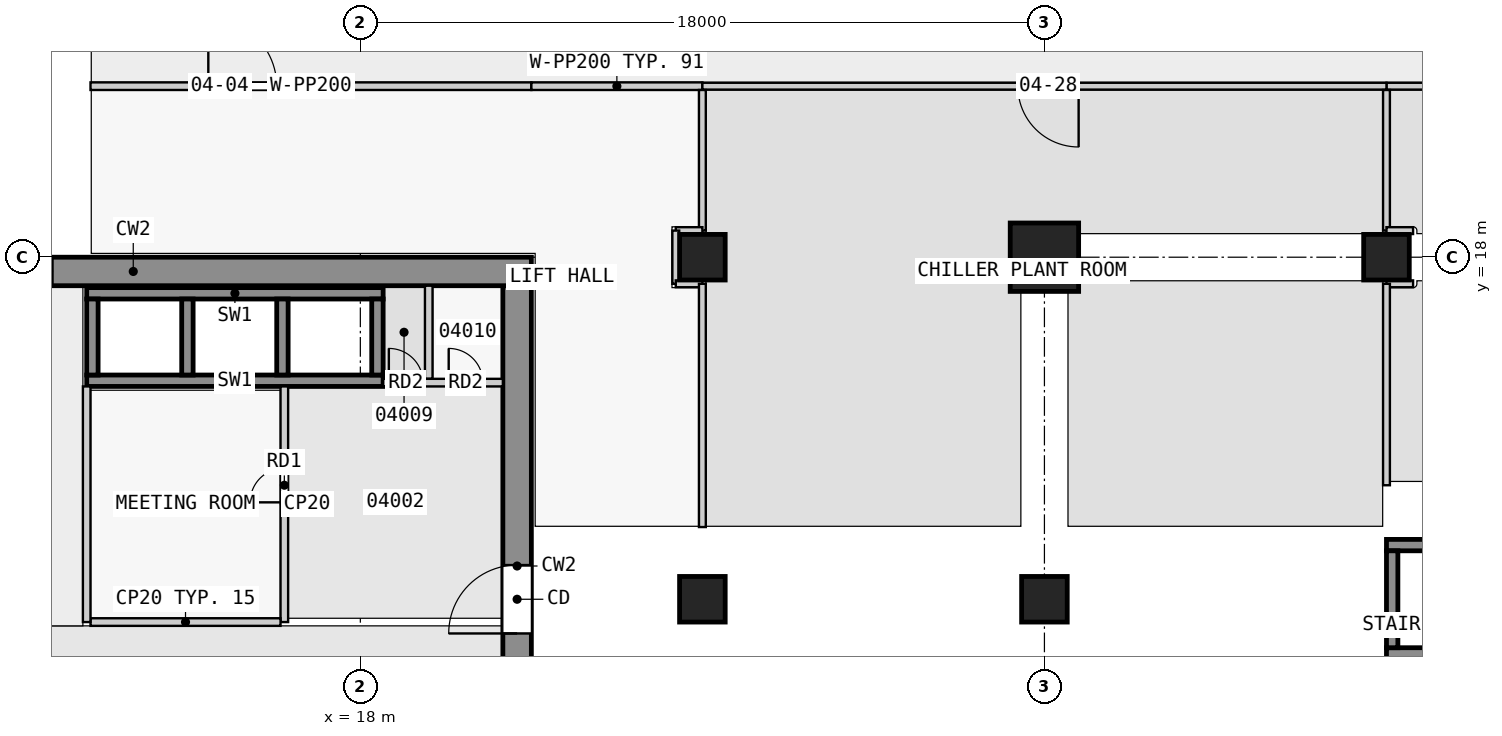
"""IFC4 building model, lengths in metres.
Left out: names, types, materials, properties, quantities, classifications, styles, units other than length and angle.
Written with IfcOpenShell. Run it as: python <this file> out.ifc"""

import sys

from ifc_helpers import new_model, si_unit, direction, frame, frame_2d, origin, origin_2d, place, context, subcontext, project, spatial, rectangle, extrude, element, fill, save


model = new_model("IFC4")
c1 = context("Model", 3, precision=1e-05, world=origin(), true_north=direction((0.0, 1.0)))
c2 = subcontext(c1, "Body", "Model", "MODEL_VIEW")
j1 = project(units=[si_unit("LENGTHUNIT", "METRE"), si_unit("PLANEANGLEUNIT", "RADIAN")], contexts=[c1])
p1 = place(None, origin())
s1 = spatial("IfcSite", under=j1, at=p1, CompositionType="ELEMENT")
p2 = place(p1, origin())
s2 = spatial("IfcBuilding", under=s1, at=p2, CompositionType="ELEMENT")
p3 = place(p2, frame((0.0, 0.0, 21.8)))
s3 = spatial("IfcBuildingStorey", under=s2, at=p3, CompositionType="ELEMENT", Elevation=21.8)
for number, where, z_axis, x_axis in (
    (1, (27.0, 9.0, 0.0), (0.0, 0.0, 1.0), (1.0, 0.0, 0.0)),
    (2, (27.0, 18.0, 0.0), (0.0, 0.0, 1.0), (1.0, 0.0, 0.0)),
    (3, (36.0, 9.0, 0.0), (0.0, 0.0, 1.0), (1.0, 0.0, 0.0)),
):
    element("IfcColumn", number, at=place(p3, frame(where, z_axis=z_axis, x_axis=x_axis)), inside=s3, PredefinedType="COLUMN", context=c2, shape_type="SweptSolid", body=[
        extrude(rectangle(XDim=1.2, YDim=1.2, at=origin_2d()), origin(), (0.0, 0.0, 1.0), 5.0),
    ])
p4 = place(p3, frame((36.0, 18.0, 0.0), z_axis=(0.0, 0.0, 1.0), x_axis=(1.0, 0.0, 0.0)))
e4 = element("IfcColumn", 4, at=p4, inside=s3, PredefinedType="COLUMN", context=c2, shape_type="SweptSolid", body=[
    extrude(rectangle(XDim=1.8, YDim=1.8, at=origin_2d()), origin(), (0.0, 0.0, 1.0), 5.0),
])
p5 = place(p3, frame((45.0, 18.0, 0.0), z_axis=(0.0, 0.0, 1.0), x_axis=(1.0, 0.0, 0.0)))
e5 = element("IfcColumn", 5, at=p5, inside=s3, PredefinedType="COLUMN", context=c2, shape_type="SweptSolid", body=[
    extrude(rectangle(XDim=1.2, YDim=1.2, at=origin_2d()), origin(), (0.0, 0.0, 1.0), 5.0),
])
p6 = place(p3, frame((1.55, 17.625, 0.0), z_axis=(0.0, 0.0, 1.0), x_axis=(1.0, 0.0, 0.0)))
e6 = element("IfcWall", 6, at=p6, inside=s3, PredefinedType="SHEAR", context=c2, shape_type="SweptSolid", body=[
    extrude(rectangle(XDim=20.95, YDim=0.75, at=frame_2d((10.475, 0.0))), origin(), (0.0, 0.0, 1.0), 4.5),
])
p7 = place(p6, frame((6.55, 0.0, 0.0)))
e7 = element("IfcOpeningElement", 7, at=p7, cuts=e6, PredefinedType="OPENING", context=c2, shape_type="SweptSolid", body=[
    extrude(rectangle(XDim=1.8, YDim=2.1, at=frame_2d((0.9, 1.05))), frame((0.0, 0.385, 0.0), z_axis=(0.0, -1.0, 0.0), x_axis=(1.0, 0.0, 0.0)), (0.0, 0.0, 1.0), 0.77),
])
p8 = place(p3, frame((22.125, 2.5, 0.0), z_axis=(0.0, 0.0, 1.0), x_axis=(0.0, 1.0, 0.0)))
e8 = element("IfcWall", 8, at=p8, inside=s3, PredefinedType="SHEAR", context=c2, shape_type="SweptSolid", body=[
    extrude(rectangle(XDim=14.75, YDim=0.75, at=frame_2d((7.375, 0.0))), origin(), (0.0, 0.0, 1.0), 4.5),
])
p9 = place(p8, frame((5.6, 0.0, 0.0)))
e9 = element("IfcOpeningElement", 9, at=p9, cuts=e8, PredefinedType="OPENING", context=c2, shape_type="SweptSolid", body=[
    extrude(rectangle(XDim=1.8, YDim=2.1, at=frame_2d((0.9, 1.05))), frame((0.0, 0.385, 0.0), z_axis=(0.0, -1.0, 0.0), x_axis=(1.0, 0.0, 0.0)), (0.0, 0.0, 1.0), 0.77),
])
p10 = place(p8, frame((3.45, 0.0, 0.0)))
e10 = element("IfcOpeningElement", 10, at=p10, cuts=e8, PredefinedType="OPENING", context=c2, shape_type="SweptSolid", body=[
    extrude(rectangle(XDim=1.1, YDim=2.1, at=frame_2d((0.55, 1.05))), frame((0.0, 0.385, 0.0), z_axis=(0.0, -1.0, 0.0), x_axis=(1.0, 0.0, 0.0)), (0.0, 0.0, 1.0), 0.77),
])
for number, where, z_axis, x_axis in (
    (11, (10.8, 17.05, 0.0), (0.0, 0.0, 1.0), (1.0, 0.0, 0.0)),
    (12, (10.8, 14.75, 0.0), (0.0, 0.0, 1.0), (1.0, 0.0, 0.0)),
):
    element("IfcWall", number, at=place(p3, frame(where, z_axis=z_axis, x_axis=x_axis)), inside=s3, PredefinedType="SHEAR", context=c2, shape_type="SweptSolid", body=[
        extrude(rectangle(XDim=7.8, YDim=0.3, at=frame_2d((3.9, 0.0))), origin(), (0.0, 0.0, 1.0), 4.5),
    ])
for number, where, z_axis, x_axis in (
    (13, (10.95, 14.9, 0.0), (0.0, 0.0, 1.0), (0.0, 1.0, 0.0)),
    (14, (13.45, 14.9, 0.0), (0.0, 0.0, 1.0), (0.0, 1.0, 0.0)),
    (15, (15.95, 14.9, 0.0), (0.0, 0.0, 1.0), (0.0, 1.0, 0.0)),
    (16, (18.45, 14.9, 0.0), (0.0, 0.0, 1.0), (0.0, 1.0, 0.0)),
):
    element("IfcWall", number, at=place(p3, frame(where, z_axis=z_axis, x_axis=x_axis)), inside=s3, PredefinedType="SHEAR", context=c2, shape_type="SweptSolid", body=[
        extrude(rectangle(XDim=2.0, YDim=0.3, at=frame_2d((1.0, 0.0))), origin(), (0.0, 0.0, 1.0), 4.5),
    ])
p11 = place(p3, frame((45.15, 7.725, 0.0), z_axis=(0.0, 0.0, 1.0), x_axis=(0.0, 1.0, 0.0)))
e17 = element("IfcWall", 17, at=p11, inside=s3, PredefinedType="SHEAR", context=c2, shape_type="SweptSolid", body=[
    extrude(rectangle(XDim=2.55, YDim=0.3, at=frame_2d((1.275, 0.0))), origin(), (0.0, 0.0, 1.0), 5.0),
])
for number, where, z_axis, x_axis in (
    (18, (45.0, 7.575, 0.0), (0.0, 0.0, 1.0), (1.0, 0.0, 0.0)),
    (19, (45.0, 10.425, 0.0), (0.0, 0.0, 1.0), (1.0, 0.0, 0.0)),
):
    element("IfcWall", number, at=place(p3, frame(where, z_axis=z_axis, x_axis=x_axis)), inside=s3, PredefinedType="SHEAR", context=c2, shape_type="SweptSolid", body=[
        extrude(rectangle(XDim=7.2, YDim=0.3, at=frame_2d((3.6, 0.0))), origin(), (0.0, 0.0, 1.0), 5.0),
    ])
p12 = place(p3, frame((10.8, 8.4, 0.0), z_axis=(0.0, 0.0, 1.0), x_axis=(0.0, 1.0, 0.0)))
e20 = element("IfcWall", 20, at=p12, inside=s3, PredefinedType="PARTITIONING", context=c2, shape_type="SweptSolid", body=[
    extrude(rectangle(XDim=6.2, YDim=0.2, at=frame_2d((3.1, 0.0))), origin(), (0.0, 0.0, 1.0), 4.5),
])
p13 = place(p3, frame((10.9, 8.4, 0.0), z_axis=(0.0, 0.0, 1.0), x_axis=(1.0, 0.0, 0.0)))
e21 = element("IfcWall", 21, at=p13, inside=s3, PredefinedType="PARTITIONING", context=c2, shape_type="SweptSolid", body=[
    extrude(rectangle(XDim=5.0, YDim=0.2, at=frame_2d((2.5, 0.0))), origin(), (0.0, 0.0, 1.0), 4.5),
])
p14 = place(p3, frame((16.0, 8.4, 0.0), z_axis=(0.0, 0.0, 1.0), x_axis=(0.0, 1.0, 0.0)))
e22 = element("IfcWall", 22, at=p14, inside=s3, PredefinedType="PARTITIONING", context=c2, shape_type="SweptSolid", body=[
    extrude(rectangle(XDim=6.2, YDim=0.2, at=frame_2d((3.1, 0.0))), origin(), (0.0, 0.0, 1.0), 4.5),
])
p15 = place(p14, frame((3.15, 0.0, 0.0)))
e23 = element("IfcOpeningElement", 23, at=p15, cuts=e22, PredefinedType="OPENING", context=c2, shape_type="SweptSolid", body=[
    extrude(rectangle(XDim=0.9, YDim=2.1, at=frame_2d((0.45, 1.05))), frame((0.0, 0.11, 0.0), z_axis=(0.0, -1.0, 0.0), x_axis=(1.0, 0.0, 0.0)), (0.0, 0.0, 1.0), 0.22),
])
p16 = place(p3, frame((18.6, 14.7, 0.0), z_axis=(0.0, 0.0, 1.0), x_axis=(1.0, 0.0, 0.0)))
e24 = element("IfcWall", 24, at=p16, inside=s3, PredefinedType="PARTITIONING", context=c2, shape_type="SweptSolid", body=[
    extrude(rectangle(XDim=3.15, YDim=0.2, at=frame_2d((1.575, 0.0))), origin(), (0.0, 0.0, 1.0), 4.5),
])
p17 = place(p16, frame((0.15, 0.0, 0.0)))
e25 = element("IfcOpeningElement", 25, at=p17, cuts=e24, PredefinedType="OPENING", context=c2, shape_type="SweptSolid", body=[
    extrude(rectangle(XDim=0.9, YDim=2.1, at=frame_2d((0.45, 1.05))), frame((0.0, 0.11, 0.0), z_axis=(0.0, -1.0, 0.0), x_axis=(1.0, 0.0, 0.0)), (0.0, 0.0, 1.0), 0.22),
])
p18 = place(p16, frame((1.725, 0.0, 0.0)))
e26 = element("IfcOpeningElement", 26, at=p18, cuts=e24, PredefinedType="OPENING", context=c2, shape_type="SweptSolid", body=[
    extrude(rectangle(XDim=0.9, YDim=2.1, at=frame_2d((0.45, 1.05))), frame((0.0, 0.11, 0.0), z_axis=(0.0, -1.0, 0.0), x_axis=(1.0, 0.0, 0.0)), (0.0, 0.0, 1.0), 0.22),
])
p19 = place(p3, frame((19.8, 14.8, 0.0), z_axis=(0.0, 0.0, 1.0), x_axis=(0.0, 1.0, 0.0)))
e27 = element("IfcWall", 27, at=p19, inside=s3, PredefinedType="PARTITIONING", context=c2, shape_type="SweptSolid", body=[
    extrude(rectangle(XDim=2.45, YDim=0.2, at=frame_2d((1.225, 0.0))), origin(), (0.0, 0.0, 1.0), 4.5),
])
p20 = place(p3, frame((10.9, 22.5, 0.0), z_axis=(0.0, 0.0, 1.0), x_axis=(1.0, 0.0, 0.0)))
e28 = element("IfcWall", 28, at=p20, inside=s3, PredefinedType="PARTITIONING", context=c2, shape_type="SweptSolid", body=[
    extrude(rectangle(XDim=11.6, YDim=0.2, at=frame_2d((5.8, 0.0))), origin(), (0.0, 0.0, 1.0), 4.5),
])
p21 = place(p20, frame((3.1, 0.0, 0.0)))
e29 = element("IfcOpeningElement", 29, at=p21, cuts=e28, PredefinedType="OPENING", context=c2, shape_type="SweptSolid", body=[
    extrude(rectangle(XDim=1.8, YDim=2.1, at=frame_2d((0.9, 1.05))), frame((0.0, 0.11, 0.0), z_axis=(0.0, -1.0, 0.0), x_axis=(1.0, 0.0, 0.0)), (0.0, 0.0, 1.0), 0.22),
])
p22 = place(p3, frame((22.5, 22.5, 0.0), z_axis=(0.0, 0.0, 1.0), x_axis=(1.0, 0.0, 0.0)))
e30 = element("IfcWall", 30, at=p22, inside=s3, PredefinedType="PARTITIONING", context=c2, shape_type="SweptSolid", body=[
    extrude(rectangle(XDim=4.5, YDim=0.2, at=frame_2d((2.25, 0.0))), origin(), (0.0, 0.0, 1.0), 4.5),
])
p23 = place(p3, frame((72.0, 22.5, 0.0), z_axis=(0.0, 0.0, 1.0), x_axis=(-1.0, 0.0, 0.0)))
e31 = element("IfcWall", 31, at=p23, inside=s3, PredefinedType="PARTITIONING", context=c2, shape_type="SweptSolid", body=[
    extrude(rectangle(XDim=27.0, YDim=0.18, at=frame_2d((13.5, 0.0))), origin(), (0.0, 0.0, 1.0), 4.5),
])
p24 = place(p3, frame((45.0, 22.5, 0.0), z_axis=(0.0, 0.0, 1.0), x_axis=(-1.0, 0.0, 0.0)))
e32 = element("IfcWall", 32, at=p24, inside=s3, PredefinedType="PARTITIONING", context=c2, shape_type="SweptSolid", body=[
    extrude(rectangle(XDim=18.0, YDim=0.18, at=frame_2d((9.0, 0.0))), origin(), (0.0, 0.0, 1.0), 4.5),
])
p25 = place(p24, frame((8.1, 0.0, 0.0)))
e33 = element("IfcOpeningElement", 33, at=p25, cuts=e32, PredefinedType="OPENING", context=c2, shape_type="SweptSolid", body=[
    extrude(rectangle(XDim=1.6, YDim=2.4, at=frame_2d((0.8, 1.2))), frame((0.0, 0.1, 0.0), z_axis=(0.0, -1.0, 0.0), x_axis=(1.0, 0.0, 0.0)), (0.0, 0.0, 1.0), 0.2),
])
p26 = place(p3, frame((27.0, 22.4, 0.0), z_axis=(0.0, 0.0, 1.0), x_axis=(0.0, -1.0, 0.0)))
e34 = element("IfcWall", 34, at=p26, inside=s3, PredefinedType="PARTITIONING", context=c2, shape_type="SweptSolid", body=[
    extrude(rectangle(XDim=3.7, YDim=0.18, at=frame_2d((1.85, 0.0))), origin(), (0.0, 0.0, 1.0), 4.5),
])
p27 = place(p3, frame((27.0, 18.7, 0.0), z_axis=(0.0, 0.0, 1.0), x_axis=(-1.0, 0.0, 0.0)))
e35 = element("IfcWall", 35, at=p27, inside=s3, PredefinedType="PARTITIONING", context=c2, shape_type="SweptSolid", body=[
    extrude(rectangle(XDim=0.7, YDim=0.18, at=frame_2d((0.35, 0.0))), origin(), (0.0, 0.0, 1.0), 4.5),
])
p28 = place(p3, frame((26.3, 18.7, 0.0), z_axis=(0.0, 0.0, 1.0), x_axis=(0.0, -1.0, 0.0)))
e36 = element("IfcWall", 36, at=p28, inside=s3, PredefinedType="PARTITIONING", context=c2, shape_type="SweptSolid", body=[
    extrude(rectangle(XDim=1.4, YDim=0.18, at=frame_2d((0.7, 0.0))), origin(), (0.0, 0.0, 1.0), 4.5),
])
p29 = place(p3, frame((26.3, 17.3, 0.0), z_axis=(0.0, 0.0, 1.0), x_axis=(1.0, 0.0, 0.0)))
e37 = element("IfcWall", 37, at=p29, inside=s3, PredefinedType="PARTITIONING", context=c2, shape_type="SweptSolid", body=[
    extrude(rectangle(XDim=0.7, YDim=0.18, at=frame_2d((0.35, 0.0))), origin(), (0.0, 0.0, 1.0), 4.5),
])
p30 = place(p3, frame((27.0, 17.3, 0.0), z_axis=(0.0, 0.0, 1.0), x_axis=(0.0, -1.0, 0.0)))
e38 = element("IfcWall", 38, at=p30, inside=s3, PredefinedType="PARTITIONING", context=c2, shape_type="SweptSolid", body=[
    extrude(rectangle(XDim=6.4, YDim=0.18, at=frame_2d((3.2, 0.0))), origin(), (0.0, 0.0, 1.0), 4.5),
])
p31 = place(p3, frame((45.0, 22.4, 0.0), z_axis=(0.0, 0.0, 1.0), x_axis=(0.0, -1.0, 0.0)))
e39 = element("IfcWall", 39, at=p31, inside=s3, PredefinedType="PARTITIONING", context=c2, shape_type="SweptSolid", body=[
    extrude(rectangle(XDim=3.7, YDim=0.18, at=frame_2d((1.85, 0.0))), origin(), (0.0, 0.0, 1.0), 4.5),
])
for number, where, z_axis, x_axis in (
    (40, (45.0, 18.7, 0.0), (0.0, 0.0, 1.0), (1.0, 0.0, 0.0)),
    (41, (45.7, 17.3, 0.0), (0.0, 0.0, 1.0), (-1.0, 0.0, 0.0)),
):
    element("IfcWall", number, at=place(p3, frame(where, z_axis=z_axis, x_axis=x_axis)), inside=s3, PredefinedType="PARTITIONING", context=c2, shape_type="SweptSolid", body=[
        extrude(rectangle(XDim=0.7, YDim=0.18, at=frame_2d((0.35, 0.0))), origin(), (0.0, 0.0, 1.0), 4.5),
    ])
p32 = place(p3, frame((45.0, 17.3, 0.0), z_axis=(0.0, 0.0, 1.0), x_axis=(0.0, -1.0, 0.0)))
e42 = element("IfcWall", 42, at=p32, inside=s3, PredefinedType="PARTITIONING", context=c2, shape_type="SweptSolid", body=[
    extrude(rectangle(XDim=5.3, YDim=0.18, at=frame_2d((2.65, 0.0))), origin(), (0.0, 0.0, 1.0), 4.5),
])
p33 = place(p15, origin())
e43 = element("IfcDoor", 43, at=p33, inside=s3, OperationType="SINGLE_SWING_LEFT", PredefinedType="DOOR", context=c2, shape_type="SweptSolid", body=[
    extrude(rectangle(XDim=0.9, YDim=2.1, at=frame_2d((0.45, 1.05))), frame((0.0, 0.025, 0.0), z_axis=(0.0, -1.0, 0.0), x_axis=(1.0, 0.0, 0.0)), (0.0, 0.0, 1.0), 0.05),
])
fill(e23, e43)
p34 = place(p9, origin())
e44 = element("IfcDoor", 44, at=p34, inside=s3, OperationType="DOUBLE_DOOR_SINGLE_SWING", PredefinedType="DOOR", context=c2, shape_type="SweptSolid", body=[
    extrude(rectangle(XDim=1.8, YDim=2.1, at=frame_2d((0.9, 1.05))), frame((0.0, 0.025, 0.0), z_axis=(0.0, -1.0, 0.0), x_axis=(1.0, 0.0, 0.0)), (0.0, 0.0, 1.0), 0.05),
])
fill(e9, e44)
p35 = place(p7, origin())
e45 = element("IfcDoor", 45, at=p35, inside=s3, OperationType="DOUBLE_DOOR_SINGLE_SWING", PredefinedType="DOOR", context=c2, shape_type="SweptSolid", body=[
    extrude(rectangle(XDim=1.8, YDim=2.1, at=frame_2d((0.9, 1.05))), frame((0.0, 0.025, 0.0), z_axis=(0.0, -1.0, 0.0), x_axis=(1.0, 0.0, 0.0)), (0.0, 0.0, 1.0), 0.05),
])
fill(e7, e45)
p36 = place(p17, origin())
e46 = element("IfcDoor", 46, at=p36, inside=s3, OperationType="SINGLE_SWING_LEFT", PredefinedType="DOOR", context=c2, shape_type="SweptSolid", body=[
    extrude(rectangle(XDim=0.9, YDim=2.1, at=frame_2d((0.45, 1.05))), frame((0.0, 0.025, 0.0), z_axis=(0.0, -1.0, 0.0), x_axis=(1.0, 0.0, 0.0)), (0.0, 0.0, 1.0), 0.05),
])
fill(e25, e46)
p37 = place(p18, origin())
e47 = element("IfcDoor", 47, at=p37, inside=s3, OperationType="SINGLE_SWING_LEFT", PredefinedType="DOOR", context=c2, shape_type="SweptSolid", body=[
    extrude(rectangle(XDim=0.9, YDim=2.1, at=frame_2d((0.45, 1.05))), frame((0.0, 0.025, 0.0), z_axis=(0.0, -1.0, 0.0), x_axis=(1.0, 0.0, 0.0)), (0.0, 0.0, 1.0), 0.05),
])
fill(e26, e47)
p38 = place(p21, origin())
e48 = element("IfcDoor", 48, at=p38, inside=s3, OperationType="DOUBLE_DOOR_SINGLE_SWING", PredefinedType="DOOR", context=c2, shape_type="SweptSolid", body=[
    extrude(rectangle(XDim=1.8, YDim=2.1, at=frame_2d((0.9, 1.05))), frame((0.0, 0.025, 0.0), z_axis=(0.0, -1.0, 0.0), x_axis=(1.0, 0.0, 0.0)), (0.0, 0.0, 1.0), 0.05),
])
fill(e29, e48)
p39 = place(p25, origin())
e49 = element("IfcDoor", 49, at=p39, inside=s3, OperationType="SINGLE_SWING_LEFT", PredefinedType="DOOR", context=c2, shape_type="SweptSolid", body=[
    extrude(rectangle(XDim=1.6, YDim=2.4, at=frame_2d((0.8, 1.2))), frame((0.0, 0.025, 0.0), z_axis=(0.0, -1.0, 0.0), x_axis=(1.0, 0.0, 0.0)), (0.0, 0.0, 1.0), 0.05),
])
fill(e33, e49)
save(model, sys.argv[1])
